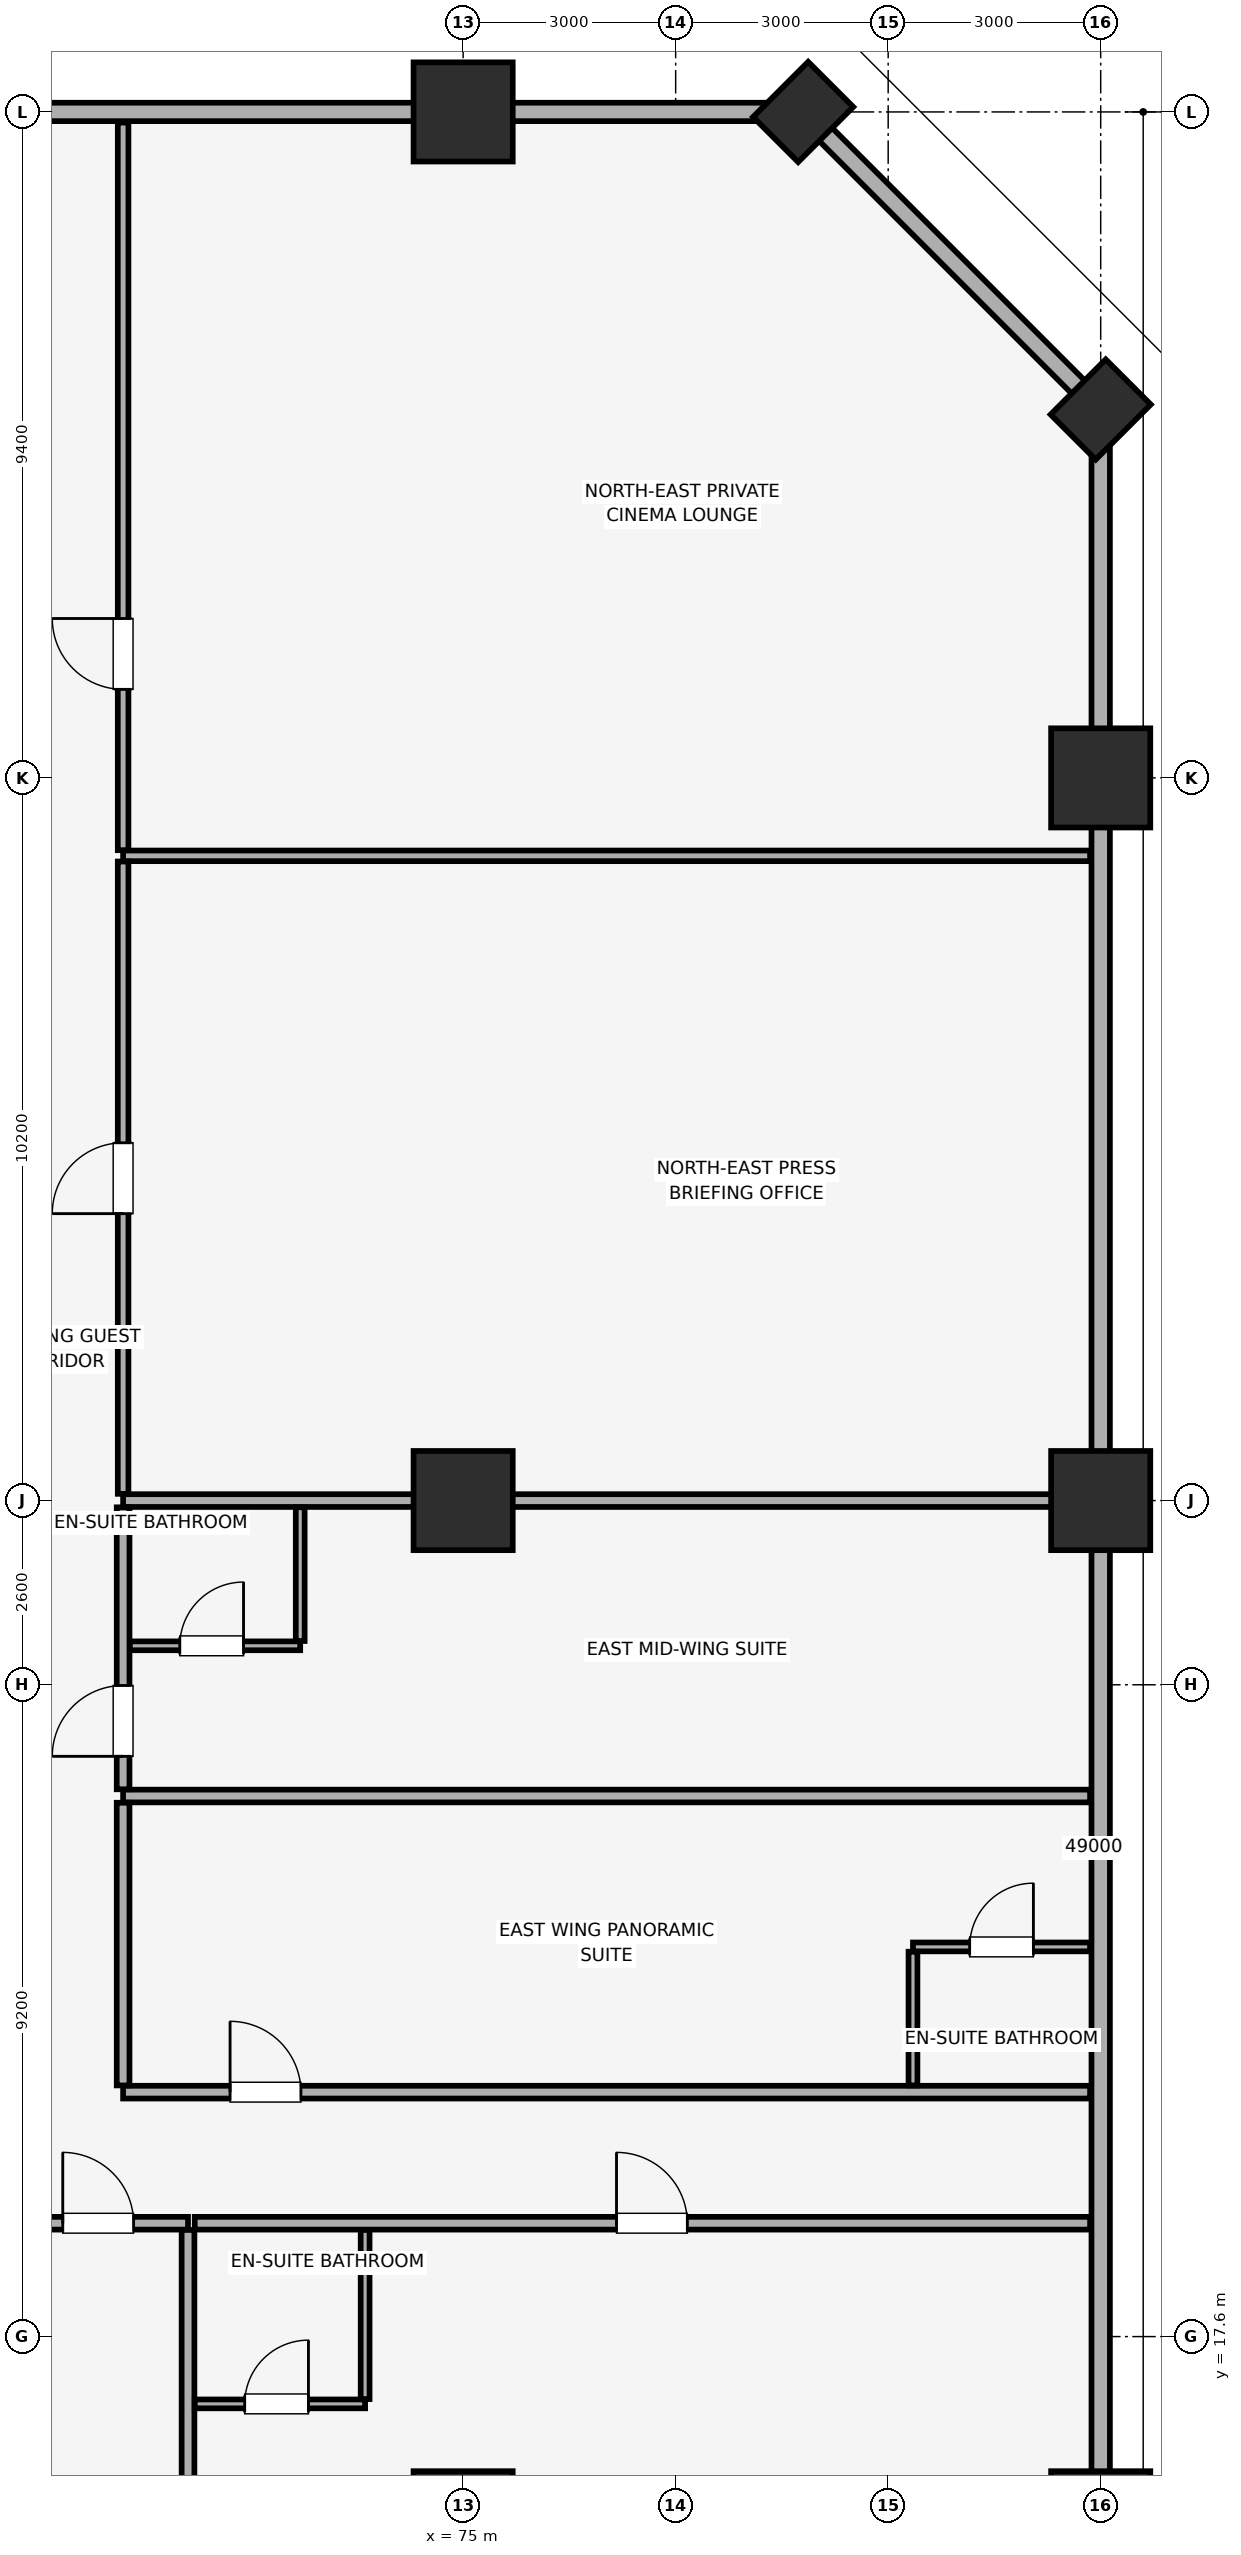
"""IFC4 building model, lengths in metres.
Left out: names, types, materials, properties, quantities, classifications, styles, units other than length and angle.
Written with IfcOpenShell. Run it as: python <this file> out.ifc"""

import sys

from ifc_helpers import new_model, si_unit, direction, frame, frame_2d, origin, origin_2d, place, context, subcontext, project, spatial, rectangle, extrude, element, fill, save


model = new_model("IFC4")
c1 = context("Model", 3, precision=1e-05, world=origin(), true_north=direction((0.0, 1.0)))
c2 = subcontext(c1, "Body", "Model", "MODEL_VIEW")
j1 = project(units=[si_unit("LENGTHUNIT", "METRE"), si_unit("PLANEANGLEUNIT", "RADIAN")], contexts=[c1])
p1 = place(None, origin())
s1 = spatial("IfcSite", under=j1, at=p1, CompositionType="ELEMENT")
p2 = place(p1, origin())
s2 = spatial("IfcBuilding", under=s1, at=p2, CompositionType="ELEMENT")
p3 = place(p2, frame((0.0, 0.0, 76.4)))
s3 = spatial("IfcBuildingStorey", under=s2, at=p3, CompositionType="ELEMENT", Elevation=76.4)
for number, where, z_axis, x_axis in (
    (1, (84.0, 15.0, 0.0), (0.0, 0.0, 1.0), (1.0, 0.0, 0.0)),
    (2, (84.0, 29.4, 0.0), (0.0, 0.0, 1.0), (1.0, 0.0, 0.0)),
    (3, (84.0, 39.6, 0.0), (0.0, 0.0, 1.0), (1.0, 0.0, 0.0)),
):
    element("IfcColumn", number, at=place(p3, frame(where, z_axis=z_axis, x_axis=x_axis)), inside=s3, PredefinedType="COLUMN", context=c2, shape_type="SweptSolid", body=[
        extrude(rectangle(XDim=1.4, YDim=1.4, at=origin_2d()), origin(), (0.0, 0.0, 1.0), 3.4),
    ])
for number, where, z_axis, x_axis in (
    (4, (84.0, 44.8, 0.0), (0.0, 0.0, 1.0), (0.707, 0.707, 0.0)),
    (5, (79.8, 49.0, 0.0), (0.0, 0.0, 1.0), (0.707, 0.707, 0.0)),
):
    element("IfcColumn", number, at=place(p3, frame(where, z_axis=z_axis, x_axis=x_axis)), inside=s3, PredefinedType="PILASTER", context=c2, shape_type="SweptSolid", body=[
        extrude(rectangle(XDim=1.1, YDim=0.9, at=origin_2d()), origin(), (0.0, 0.0, 1.0), 3.4),
    ])
for number, where, z_axis, x_axis in (
    (6, (75.0, 15.0, 0.0), (0.0, 0.0, 1.0), (1.0, 0.0, 0.0)),
    (7, (75.0, 29.4, 0.0), (0.0, 0.0, 1.0), (1.0, 0.0, 0.0)),
    (8, (75.0, 49.0, 0.0), (0.0, 0.0, 1.0), (1.0, 0.0, 0.0)),
):
    element("IfcColumn", number, at=place(p3, frame(where, z_axis=z_axis, x_axis=x_axis)), inside=s3, PredefinedType="COLUMN", context=c2, shape_type="SweptSolid", body=[
        extrude(rectangle(XDim=1.4, YDim=1.4, at=origin_2d()), origin(), (0.0, 0.0, 1.0), 3.4),
    ])
p4 = place(p3, frame((84.0, 4.2, 0.0), z_axis=(0.0, 0.0, 1.0), x_axis=(0.0, 1.0, 0.0)))
e9 = element("IfcWall", 9, at=p4, inside=s3, PredefinedType="SOLIDWALL", context=c2, shape_type="SweptSolid", body=[
    extrude(rectangle(XDim=40.6, YDim=0.26, at=frame_2d((20.3, 0.0))), origin(), (0.0, 0.0, 1.0), 2.45),
])
p5 = place(p3, frame((84.0, 44.8, 0.0), z_axis=(0.0, 0.0, 1.0), x_axis=(-0.707106781187, 0.707106781187, 0.0)))
e10 = element("IfcWall", 10, at=p5, inside=s3, PredefinedType="SOLIDWALL", context=c2, shape_type="SweptSolid", body=[
    extrude(rectangle(XDim=5.94, YDim=0.26, at=frame_2d((2.97, 0.0))), origin(), (0.0, 0.0, 1.0), 2.45),
])
p6 = place(p3, frame((79.8, 49.0, 0.0), z_axis=(0.0, 0.0, 1.0), x_axis=(-1.0, 0.0, 0.0)))
e11 = element("IfcWall", 11, at=p6, inside=s3, PredefinedType="SOLIDWALL", context=c2, shape_type="SweptSolid", body=[
    extrude(rectangle(XDim=75.6, YDim=0.26, at=frame_2d((37.8, 0.0))), origin(), (0.0, 0.0, 1.0), 2.45),
])
p7 = place(p3, frame((62.878, 19.2, 0.0), z_axis=(0.0, 0.0, 1.0), x_axis=(1.0, 0.0, 0.0)))
e12 = element("IfcWall", 12, at=p7, inside=s3, PredefinedType="PARTITIONING", context=c2, shape_type="SweptSolid", body=[
    extrude(rectangle(XDim=8.238, YDim=0.18, at=frame_2d((4.119, 0.0))), origin(), (0.0, 0.0, 1.0), 3.4),
])
p8 = place(p7, frame((6.47, 0.0, 0.0)))
e13 = element("IfcOpeningElement", 13, at=p8, cuts=e12, PredefinedType="OPENING", context=c2, shape_type="SweptSolid", body=[
    extrude(rectangle(XDim=1.0, YDim=2.15, at=frame_2d((0.5, 1.075))), frame((0.0, 0.1, 0.0), z_axis=(0.0, -1.0, 0.0), x_axis=(1.0, 0.0, 0.0)), (0.0, 0.0, 1.0), 0.2),
])
p9 = place(p3, frame((71.116, 0.15, 0.0), z_axis=(0.0, 0.0, 1.0), x_axis=(0.0, 1.0, 0.0)))
e14 = element("IfcWall", 14, at=p9, inside=s3, PredefinedType="PARTITIONING", context=c2, shape_type="SweptSolid", body=[
    extrude(rectangle(XDim=18.955, YDim=0.18, at=frame_2d((9.478, 0.0))), origin(), (0.0, 0.0, 1.0), 3.4),
])
p10 = place(p3, frame((71.211, 19.2, 0.0), z_axis=(0.0, 0.0, 1.0), x_axis=(1.0, 0.0, 0.0)))
e15 = element("IfcWall", 15, at=p10, inside=s3, PredefinedType="PARTITIONING", context=c2, shape_type="SweptSolid", body=[
    extrude(rectangle(XDim=12.639, YDim=0.18, at=frame_2d((6.319, 0.0))), origin(), (0.0, 0.0, 1.0), 3.4),
])
p11 = place(p10, frame((5.954, 0.0, 0.0)))
e16 = element("IfcOpeningElement", 16, at=p11, cuts=e15, PredefinedType="OPENING", context=c2, shape_type="SweptSolid", body=[
    extrude(rectangle(XDim=1.0, YDim=2.15, at=frame_2d((0.5, 1.075))), frame((0.0, 0.1, 0.0), z_axis=(0.0, -1.0, 0.0), x_axis=(1.0, 0.0, 0.0)), (0.0, 0.0, 1.0), 0.2),
])
p12 = place(p3, frame((71.211, 16.65, 0.0), z_axis=(0.0, 0.0, 1.0), x_axis=(1.0, 0.0, 0.0)))
e17 = element("IfcWall", 17, at=p12, inside=s3, PredefinedType="PARTITIONING", context=c2, shape_type="SweptSolid", body=[
    extrude(rectangle(XDim=2.405, YDim=0.125, at=frame_2d((1.203, 0.0))), origin(), (0.0, 0.0, 1.0), 3.4),
])
p13 = place(p12, frame((0.705, 0.0, 0.0)))
e18 = element("IfcOpeningElement", 18, at=p13, cuts=e17, PredefinedType="OPENING", context=c2, shape_type="SweptSolid", body=[
    extrude(rectangle(XDim=0.9, YDim=2.1, at=frame_2d((0.45, 1.05))), frame((0.0, 0.073, 0.0), z_axis=(0.0, -1.0, 0.0), x_axis=(1.0, 0.0, 0.0)), (0.0, 0.0, 1.0), 0.145),
])
p14 = place(p3, frame((73.616, 16.718, 0.0), z_axis=(0.0, 0.0, 1.0), x_axis=(0.0, 1.0, 0.0)))
e19 = element("IfcWall", 19, at=p14, inside=s3, PredefinedType="PARTITIONING", context=c2, shape_type="SweptSolid", body=[
    extrude(rectangle(XDim=2.387, YDim=0.125, at=frame_2d((1.194, 0.0))), origin(), (0.0, 0.0, 1.0), 3.4),
])
p15 = place(p3, frame((70.2, 21.05, 0.0), z_axis=(0.0, 0.0, 1.0), x_axis=(1.0, 0.0, 0.0)))
e20 = element("IfcWall", 20, at=p15, inside=s3, PredefinedType="PARTITIONING", context=c2, shape_type="SweptSolid", body=[
    extrude(rectangle(XDim=13.65, YDim=0.18, at=frame_2d((6.825, 0.0))), origin(), (0.0, 0.0, 1.0), 3.4),
])
p16 = place(p15, frame((1.51, 0.0, 0.0)))
e21 = element("IfcOpeningElement", 21, at=p16, cuts=e20, PredefinedType="OPENING", context=c2, shape_type="SweptSolid", body=[
    extrude(rectangle(XDim=1.0, YDim=2.15, at=frame_2d((0.5, 1.075))), frame((0.0, 0.1, 0.0), z_axis=(0.0, -1.0, 0.0), x_axis=(1.0, 0.0, 0.0)), (0.0, 0.0, 1.0), 0.2),
])
p17 = place(p3, frame((70.2, 25.23, 0.0), z_axis=(0.0, 0.0, 1.0), x_axis=(1.0, 0.0, 0.0)))
e22 = element("IfcWall", 22, at=p17, inside=s3, PredefinedType="PARTITIONING", context=c2, shape_type="SweptSolid", body=[
    extrude(rectangle(XDim=13.65, YDim=0.18, at=frame_2d((6.825, 0.0))), origin(), (0.0, 0.0, 1.0), 3.4),
])
p18 = place(p3, frame((70.2, 21.145, 0.0), z_axis=(0.0, 0.0, 1.0), x_axis=(0.0, 1.0, 0.0)))
e23 = element("IfcWall", 23, at=p18, inside=s3, PredefinedType="PARTITIONING", context=c2, shape_type="SweptSolid", body=[
    extrude(rectangle(XDim=3.99, YDim=0.18, at=frame_2d((1.995, 0.0))), origin(), (0.0, 0.0, 1.0), 3.4),
])
p19 = place(p3, frame((81.35, 23.1, 0.0), z_axis=(0.0, 0.0, 1.0), x_axis=(1.0, 0.0, 0.0)))
e24 = element("IfcWall", 24, at=p19, inside=s3, PredefinedType="PARTITIONING", context=c2, shape_type="SweptSolid", body=[
    extrude(rectangle(XDim=2.5, YDim=0.125, at=frame_2d((1.25, 0.0))), origin(), (0.0, 0.0, 1.0), 3.4),
])
p20 = place(p19, frame((0.8, 0.0, 0.0)))
e25 = element("IfcOpeningElement", 25, at=p20, cuts=e24, PredefinedType="OPENING", context=c2, shape_type="SweptSolid", body=[
    extrude(rectangle(XDim=0.9, YDim=2.1, at=frame_2d((0.45, 1.05))), frame((0.0, 0.073, 0.0), z_axis=(0.0, -1.0, 0.0), x_axis=(1.0, 0.0, 0.0)), (0.0, 0.0, 1.0), 0.145),
])
p21 = place(p3, frame((81.35, 21.145, 0.0), z_axis=(0.0, 0.0, 1.0), x_axis=(0.0, 1.0, 0.0)))
e26 = element("IfcWall", 26, at=p21, inside=s3, PredefinedType="PARTITIONING", context=c2, shape_type="SweptSolid", body=[
    extrude(rectangle(XDim=1.887, YDim=0.125, at=frame_2d((0.944, 0.0))), origin(), (0.0, 0.0, 1.0), 3.4),
])
p22 = place(p3, frame((70.2, 29.4, 0.0), z_axis=(0.0, 0.0, 1.0), x_axis=(1.0, 0.0, 0.0)))
e27 = element("IfcWall", 27, at=p22, inside=s3, PredefinedType="PARTITIONING", context=c2, shape_type="SweptSolid", body=[
    extrude(rectangle(XDim=13.65, YDim=0.18, at=frame_2d((6.825, 0.0))), origin(), (0.0, 0.0, 1.0), 2.49),
])
p23 = place(p3, frame((70.2, 25.325, 0.0), z_axis=(0.0, 0.0, 1.0), x_axis=(0.0, 1.0, 0.0)))
e28 = element("IfcWall", 28, at=p23, inside=s3, PredefinedType="PARTITIONING", context=c2, shape_type="SweptSolid", body=[
    extrude(rectangle(XDim=3.98, YDim=0.18, at=frame_2d((1.99, 0.0))), origin(), (0.0, 0.0, 1.0), 3.4),
])
p24 = place(p23, frame((0.465, 0.0, 0.0)))
e29 = element("IfcOpeningElement", 29, at=p24, cuts=e28, PredefinedType="OPENING", context=c2, shape_type="SweptSolid", body=[
    extrude(rectangle(XDim=1.0, YDim=2.15, at=frame_2d((0.5, 1.075))), frame((0.0, 0.1, 0.0), z_axis=(0.0, -1.0, 0.0), x_axis=(1.0, 0.0, 0.0)), (0.0, 0.0, 1.0), 0.2),
])
p25 = place(p3, frame((70.295, 27.35, 0.0), z_axis=(0.0, 0.0, 1.0), x_axis=(1.0, 0.0, 0.0)))
e30 = element("IfcWall", 30, at=p25, inside=s3, PredefinedType="PARTITIONING", context=c2, shape_type="SweptSolid", body=[
    extrude(rectangle(XDim=2.405, YDim=0.125, at=frame_2d((1.203, 0.0))), origin(), (0.0, 0.0, 1.0), 3.4),
])
p26 = place(p25, frame((0.705, 0.0, 0.0)))
e31 = element("IfcOpeningElement", 31, at=p26, cuts=e30, PredefinedType="OPENING", context=c2, shape_type="SweptSolid", body=[
    extrude(rectangle(XDim=0.9, YDim=2.1, at=frame_2d((0.45, 1.05))), frame((0.0, 0.073, 0.0), z_axis=(0.0, -1.0, 0.0), x_axis=(1.0, 0.0, 0.0)), (0.0, 0.0, 1.0), 0.145),
])
p27 = place(p3, frame((72.7, 27.417, 0.0), z_axis=(0.0, 0.0, 1.0), x_axis=(0.0, 1.0, 0.0)))
e32 = element("IfcWall", 32, at=p27, inside=s3, PredefinedType="PARTITIONING", context=c2, shape_type="SweptSolid", body=[
    extrude(rectangle(XDim=1.887, YDim=0.125, at=frame_2d((0.944, 0.0))), origin(), (0.0, 0.0, 1.0), 3.4),
])
p28 = place(p3, frame((70.2, 38.5, 0.0), z_axis=(0.0, 0.0, 1.0), x_axis=(1.0, 0.0, 0.0)))
e33 = element("IfcWall", 33, at=p28, inside=s3, PredefinedType="PARTITIONING", context=c2, shape_type="SweptSolid", body=[
    extrude(rectangle(XDim=13.65, YDim=0.15, at=frame_2d((6.825, 0.0))), origin(), (0.0, 0.0, 1.0), 3.4),
])
p29 = place(p3, frame((70.2, 29.495, 0.0), z_axis=(0.0, 0.0, 1.0), x_axis=(0.0, 1.0, 0.0)))
e34 = element("IfcWall", 34, at=p29, inside=s3, PredefinedType="PARTITIONING", context=c2, shape_type="SweptSolid", body=[
    extrude(rectangle(XDim=8.925, YDim=0.15, at=frame_2d((4.462, 0.0))), origin(), (0.0, 0.0, 1.0), 3.4),
])
p30 = place(p29, frame((3.955, 0.0, 0.0)))
e35 = element("IfcOpeningElement", 35, at=p30, cuts=e34, PredefinedType="OPENING", context=c2, shape_type="SweptSolid", body=[
    extrude(rectangle(XDim=1.0, YDim=2.15, at=frame_2d((0.5, 1.075))), frame((0.0, 0.085, 0.0), z_axis=(0.0, -1.0, 0.0), x_axis=(1.0, 0.0, 0.0)), (0.0, 0.0, 1.0), 0.17),
])
p31 = place(p3, frame((70.2, 38.58, 0.0), z_axis=(0.0, 0.0, 1.0), x_axis=(0.0, 1.0, 0.0)))
e36 = element("IfcWall", 36, at=p31, inside=s3, PredefinedType="PARTITIONING", context=c2, shape_type="SweptSolid", body=[
    extrude(rectangle(XDim=10.27, YDim=0.15, at=frame_2d((5.135, 0.0))), origin(), (0.0, 0.0, 1.0), 3.4),
])
p32 = place(p31, frame((2.27, 0.0, 0.0)))
e37 = element("IfcOpeningElement", 37, at=p32, cuts=e36, PredefinedType="OPENING", context=c2, shape_type="SweptSolid", body=[
    extrude(rectangle(XDim=1.0, YDim=2.15, at=frame_2d((0.5, 1.075))), frame((0.0, 0.085, 0.0), z_axis=(0.0, -1.0, 0.0), x_axis=(1.0, 0.0, 0.0)), (0.0, 0.0, 1.0), 0.17),
])
p33 = place(p8, origin())
e38 = element("IfcDoor", 38, at=p33, inside=s3, OperationType="SINGLE_SWING_LEFT", PredefinedType="DOOR", context=c2, shape_type="SweptSolid", body=[
    extrude(rectangle(XDim=1.0, YDim=2.15, at=frame_2d((0.5, 1.075))), frame((0.0, 0.025, 0.0), z_axis=(0.0, -1.0, 0.0), x_axis=(1.0, 0.0, 0.0)), (0.0, 0.0, 1.0), 0.05),
])
fill(e13, e38)
p34 = place(p11, origin())
e39 = element("IfcDoor", 39, at=p34, inside=s3, OperationType="SINGLE_SWING_LEFT", PredefinedType="DOOR", context=c2, shape_type="SweptSolid", body=[
    extrude(rectangle(XDim=1.0, YDim=2.15, at=frame_2d((0.5, 1.075))), frame((0.0, 0.025, 0.0), z_axis=(0.0, -1.0, 0.0), x_axis=(1.0, 0.0, 0.0)), (0.0, 0.0, 1.0), 0.05),
])
fill(e16, e39)
p35 = place(p13, origin())
e40 = element("IfcDoor", 40, at=p35, inside=s3, OperationType="SINGLE_SWING_RIGHT", PredefinedType="DOOR", context=c2, shape_type="SweptSolid", body=[
    extrude(rectangle(XDim=0.9, YDim=2.1, at=frame_2d((0.45, 1.05))), frame((0.0, 0.025, 0.0), z_axis=(0.0, -1.0, 0.0), x_axis=(1.0, 0.0, 0.0)), (0.0, 0.0, 1.0), 0.05),
])
fill(e18, e40)
p36 = place(p16, origin())
e41 = element("IfcDoor", 41, at=p36, inside=s3, OperationType="SINGLE_SWING_LEFT", PredefinedType="DOOR", context=c2, shape_type="SweptSolid", body=[
    extrude(rectangle(XDim=1.0, YDim=2.15, at=frame_2d((0.5, 1.075))), frame((0.0, 0.025, 0.0), z_axis=(0.0, -1.0, 0.0), x_axis=(1.0, 0.0, 0.0)), (0.0, 0.0, 1.0), 0.05),
])
fill(e21, e41)
p37 = place(p20, origin())
e42 = element("IfcDoor", 42, at=p37, inside=s3, OperationType="SINGLE_SWING_RIGHT", PredefinedType="DOOR", context=c2, shape_type="SweptSolid", body=[
    extrude(rectangle(XDim=0.9, YDim=2.1, at=frame_2d((0.45, 1.05))), frame((0.0, 0.025, 0.0), z_axis=(0.0, -1.0, 0.0), x_axis=(1.0, 0.0, 0.0)), (0.0, 0.0, 1.0), 0.05),
])
fill(e25, e42)
p38 = place(p24, origin())
e43 = element("IfcDoor", 43, at=p38, inside=s3, OperationType="SINGLE_SWING_LEFT", PredefinedType="DOOR", context=c2, shape_type="SweptSolid", body=[
    extrude(rectangle(XDim=1.0, YDim=2.15, at=frame_2d((0.5, 1.075))), frame((0.0, 0.025, 0.0), z_axis=(0.0, -1.0, 0.0), x_axis=(1.0, 0.0, 0.0)), (0.0, 0.0, 1.0), 0.05),
])
fill(e29, e43)
p39 = place(p26, origin())
e44 = element("IfcDoor", 44, at=p39, inside=s3, OperationType="SINGLE_SWING_RIGHT", PredefinedType="DOOR", context=c2, shape_type="SweptSolid", body=[
    extrude(rectangle(XDim=0.9, YDim=2.1, at=frame_2d((0.45, 1.05))), frame((0.0, 0.025, 0.0), z_axis=(0.0, -1.0, 0.0), x_axis=(1.0, 0.0, 0.0)), (0.0, 0.0, 1.0), 0.05),
])
fill(e31, e44)
p40 = place(p30, origin())
e45 = element("IfcDoor", 45, at=p40, inside=s3, OperationType="SINGLE_SWING_LEFT", PredefinedType="DOOR", context=c2, shape_type="SweptSolid", body=[
    extrude(rectangle(XDim=1.0, YDim=2.15, at=frame_2d((0.5, 1.075))), frame((0.0, 0.025, 0.0), z_axis=(0.0, -1.0, 0.0), x_axis=(1.0, 0.0, 0.0)), (0.0, 0.0, 1.0), 0.05),
])
fill(e35, e45)
p41 = place(p32, origin())
e46 = element("IfcDoor", 46, at=p41, inside=s3, OperationType="SINGLE_SWING_RIGHT", PredefinedType="DOOR", context=c2, shape_type="SweptSolid", body=[
    extrude(rectangle(XDim=1.0, YDim=2.15, at=frame_2d((0.5, 1.075))), frame((0.0, 0.025, 0.0), z_axis=(0.0, -1.0, 0.0), x_axis=(1.0, 0.0, 0.0)), (0.0, 0.0, 1.0), 0.05),
])
fill(e37, e46)
save(model, sys.argv[1])
